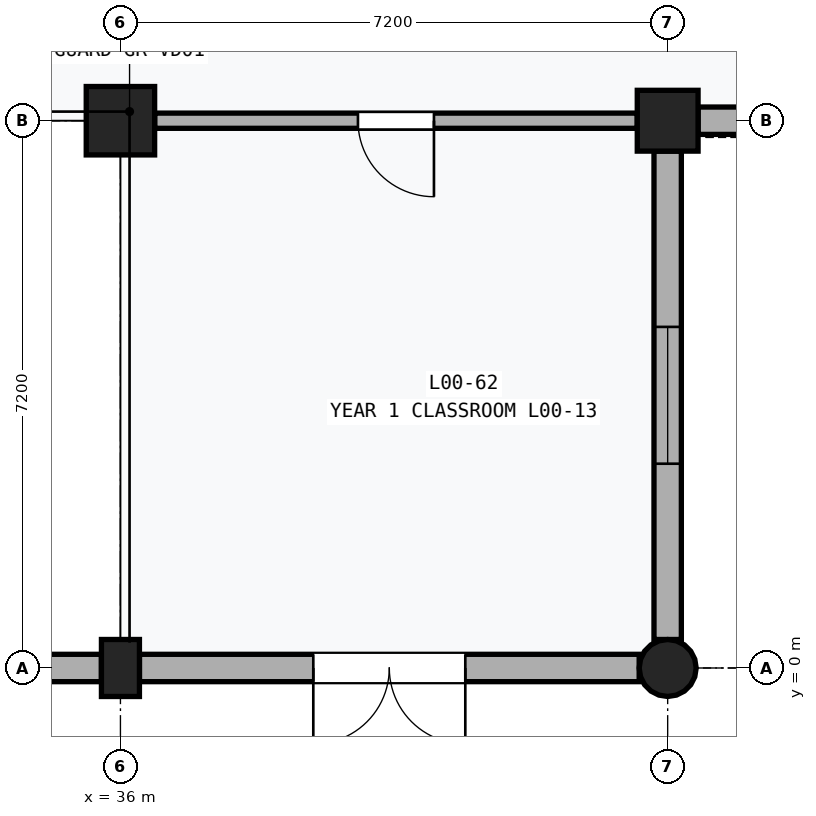
"""IFC4 building model, lengths in metres.
Left out: names, types, materials, properties, quantities, classifications, styles, units other than length and angle.
Written with IfcOpenShell. Run it as: python <this file> out.ifc"""

import sys

from ifc_helpers import new_model, si_unit, direction, frame, frame_2d, origin, origin_2d, place, context, subcontext, project, spatial, rectangle, circle, extrude, element, fill, save


model = new_model("IFC4")
c1 = context("Model", 3, precision=1e-05, world=origin(), true_north=direction((0.0, 1.0)))
c2 = subcontext(c1, "Body", "Model", "MODEL_VIEW")
j1 = project(units=[si_unit("LENGTHUNIT", "METRE"), si_unit("PLANEANGLEUNIT", "RADIAN")], contexts=[c1])
p1 = place(None, origin())
s1 = spatial("IfcSite", under=j1, at=p1, CompositionType="ELEMENT")
p2 = place(p1, origin())
s2 = spatial("IfcBuilding", under=s1, at=p2, CompositionType="ELEMENT")
p3 = place(p2, origin())
s3 = spatial("IfcBuildingStorey", under=s2, at=p3, CompositionType="ELEMENT", Elevation=0.0)
p4 = place(p3, frame((36.0, 0.0, 0.0), z_axis=(0.0, 0.0, 1.0), x_axis=(1.0, 0.0, 0.0)))
e1 = element("IfcColumn", 1, at=p4, inside=s3, PredefinedType="PILASTER", context=c2, shape_type="SweptSolid", body=[
    extrude(rectangle(XDim=0.5, YDim=0.75, at=origin_2d()), origin(), (0.0, 0.0, 1.0), 4.8),
])
p5 = place(p3, frame((36.0, 7.2, 0.0), z_axis=(0.0, 0.0, 1.0), x_axis=(1.0, 0.0, 0.0)))
e2 = element("IfcColumn", 2, at=p5, inside=s3, PredefinedType="COLUMN", context=c2, shape_type="SweptSolid", body=[
    extrude(rectangle(XDim=0.9, YDim=0.9, at=origin_2d()), origin(), (0.0, 0.0, 1.0), 4.8),
])
p6 = place(p3, frame((43.2, 0.0, 0.0), z_axis=(0.0, 0.0, 1.0), x_axis=(1.0, 0.0, 0.0)))
e3 = element("IfcColumn", 3, at=p6, inside=s3, PredefinedType="COLUMN", context=c2, shape_type="SweptSolid", body=[
    extrude(circle(Radius=0.375, at=origin_2d()), origin(), (0.0, 0.0, 1.0), 4.8),
])
p7 = place(p3, frame((43.2, 7.2, 0.0), z_axis=(0.0, 0.0, 1.0), x_axis=(1.0, 0.0, 0.0)))
e4 = element("IfcColumn", 4, at=p7, inside=s3, PredefinedType="COLUMN", context=c2, shape_type="SweptSolid", body=[
    extrude(rectangle(XDim=0.8, YDim=0.8, at=origin_2d()), origin(), (0.0, 0.0, 1.0), 4.8),
])
p8 = place(p3, frame((29.175, 0.0, 0.0), z_axis=(0.0, 0.0, 1.0), x_axis=(1.0, 0.0, 0.0)))
e5 = element("IfcWall", 5, at=p8, inside=s3, PredefinedType="SOLIDWALL", context=c2, shape_type="SweptSolid", body=[
    extrude(rectangle(XDim=6.575, YDim=0.36, at=frame_2d((3.288, 0.0))), origin(), (0.0, 0.0, 1.0), 3.89),
])
p9 = place(p8, frame((2.188, 0.0, 0.0)))
e6 = element("IfcOpeningElement", 6, at=p9, cuts=e5, PredefinedType="OPENING", context=c2, shape_type="SweptSolid", body=[
    extrude(rectangle(XDim=2.2, YDim=2.4, at=frame_2d((1.1, 1.2))), frame((0.0, 0.192, 0.0), z_axis=(0.0, -1.0, 0.0), x_axis=(1.0, 0.0, 0.0)), (0.0, 0.0, 1.0), 0.384),
])
p10 = place(p3, frame((36.25, 0.0, 0.0), z_axis=(0.0, 0.0, 1.0), x_axis=(1.0, 0.0, 0.0)))
e7 = element("IfcWall", 7, at=p10, inside=s3, PredefinedType="SOLIDWALL", context=c2, shape_type="SweptSolid", body=[
    extrude(rectangle(XDim=6.575, YDim=0.36, at=frame_2d((3.288, 0.0))), origin(), (0.0, 0.0, 1.0), 3.89),
])
p11 = place(p10, frame((2.288, 0.0, 0.0)))
e8 = element("IfcOpeningElement", 8, at=p11, cuts=e7, PredefinedType="OPENING", context=c2, shape_type="SweptSolid", body=[
    extrude(rectangle(XDim=2.0, YDim=2.4, at=frame_2d((1.0, 1.2))), frame((0.0, 0.192, 0.0), z_axis=(0.0, -1.0, 0.0), x_axis=(1.0, 0.0, 0.0)), (0.0, 0.0, 1.0), 0.384),
])
p12 = place(p3, frame((43.2, 0.375, 0.0), z_axis=(0.0, 0.0, 1.0), x_axis=(0.0, 1.0, 0.0)))
e9 = element("IfcWall", 9, at=p12, inside=s3, PredefinedType="SOLIDWALL", context=c2, shape_type="SweptSolid", body=[
    extrude(rectangle(XDim=6.425, YDim=0.36, at=frame_2d((3.212, 0.0))), origin(), (0.0, 0.0, 1.0), 3.89),
])
p13 = place(p12, frame((2.312, 0.0, 0.85)))
e10 = element("IfcOpeningElement", 10, at=p13, cuts=e9, PredefinedType="OPENING", context=c2, shape_type="SweptSolid", body=[
    extrude(rectangle(XDim=1.8, YDim=2.0, at=frame_2d((0.9, 1.0))), frame((0.0, 0.192, 0.0), z_axis=(0.0, -1.0, 0.0), x_axis=(1.0, 0.0, 0.0)), (0.0, 0.0, 1.0), 0.384),
])
p14 = place(p3, frame((43.6, 7.2, 0.0), z_axis=(0.0, 0.0, 1.0), x_axis=(1.0, 0.0, 0.0)))
e11 = element("IfcWall", 11, at=p14, inside=s3, PredefinedType="SOLIDWALL", context=c2, shape_type="SweptSolid", body=[
    extrude(rectangle(XDim=6.4, YDim=0.36, at=frame_2d((3.2, 0.0))), origin(), (0.0, 0.0, 1.0), 3.89),
])
p15 = place(p14, frame((2.3, 0.0, 0.0)))
e12 = element("IfcOpeningElement", 12, at=p15, cuts=e11, PredefinedType="OPENING", context=c2, shape_type="SweptSolid", body=[
    extrude(rectangle(XDim=1.8, YDim=2.35, at=frame_2d((0.9, 1.175))), frame((0.0, 0.192, 0.0), z_axis=(0.0, -1.0, 0.0), x_axis=(1.0, 0.0, 0.0)), (0.0, 0.0, 1.0), 0.384),
])
p16 = place(p3, frame((36.45, 7.2, 0.0), z_axis=(0.0, 0.0, 1.0), x_axis=(1.0, 0.0, 0.0)))
e13 = element("IfcWall", 13, at=p16, inside=s3, PredefinedType="PARTITIONING", context=c2, shape_type="SweptSolid", body=[
    extrude(rectangle(XDim=6.35, YDim=0.2, at=frame_2d((3.175, 0.0))), origin(), (0.0, 0.0, 1.0), 3.62),
])
p17 = place(p16, frame((2.675, 0.0, 0.0)))
e14 = element("IfcOpeningElement", 14, at=p17, cuts=e13, PredefinedType="OPENING", context=c2, shape_type="SweptSolid", body=[
    extrude(rectangle(XDim=1.0, YDim=2.1, at=frame_2d((0.5, 1.05))), frame((0.0, 0.112, 0.0), z_axis=(0.0, -1.0, 0.0), x_axis=(1.0, 0.0, 0.0)), (0.0, 0.0, 1.0), 0.224),
])
p18 = place(p11, frame((2.0, 0.0, 0.0), z_axis=(0.0, 0.0, 1.0), x_axis=(-1.0, 0.0, 0.0)))
e15 = element("IfcDoor", 15, at=p18, inside=s3, OperationType="DOUBLE_DOOR_SINGLE_SWING", PredefinedType="DOOR", context=c2, shape_type="SweptSolid", body=[
    extrude(rectangle(XDim=2.0, YDim=2.4, at=frame_2d((1.0, 1.2))), frame((0.0, 0.025, 0.0), z_axis=(0.0, -1.0, 0.0), x_axis=(1.0, 0.0, 0.0)), (0.0, 0.0, 1.0), 0.05),
])
fill(e8, e15)
p19 = place(p13, origin())
e16 = element("IfcWindow", 16, at=p19, inside=s3, PartitioningType="SINGLE_PANEL", PredefinedType="WINDOW", context=c2, shape_type="SweptSolid", body=[
    extrude(rectangle(XDim=1.8, YDim=2.0, at=frame_2d((0.9, 1.0))), frame((0.0, 0.03, 0.0), z_axis=(0.0, -1.0, 0.0), x_axis=(1.0, 0.0, 0.0)), (0.0, 0.0, 1.0), 0.06),
])
fill(e10, e16)
p20 = place(p17, frame((1.0, 0.0, 0.0), z_axis=(0.0, 0.0, 1.0), x_axis=(-1.0, 0.0, 0.0)))
e17 = element("IfcDoor", 17, at=p20, inside=s3, OperationType="SINGLE_SWING_LEFT", PredefinedType="DOOR", context=c2, shape_type="SweptSolid", body=[
    extrude(rectangle(XDim=1.0, YDim=2.1, at=frame_2d((0.5, 1.05))), frame((0.0, 0.025, 0.0), z_axis=(0.0, -1.0, 0.0), x_axis=(1.0, 0.0, 0.0)), (0.0, 0.0, 1.0), 0.05),
])
fill(e14, e17)
save(model, sys.argv[1])
